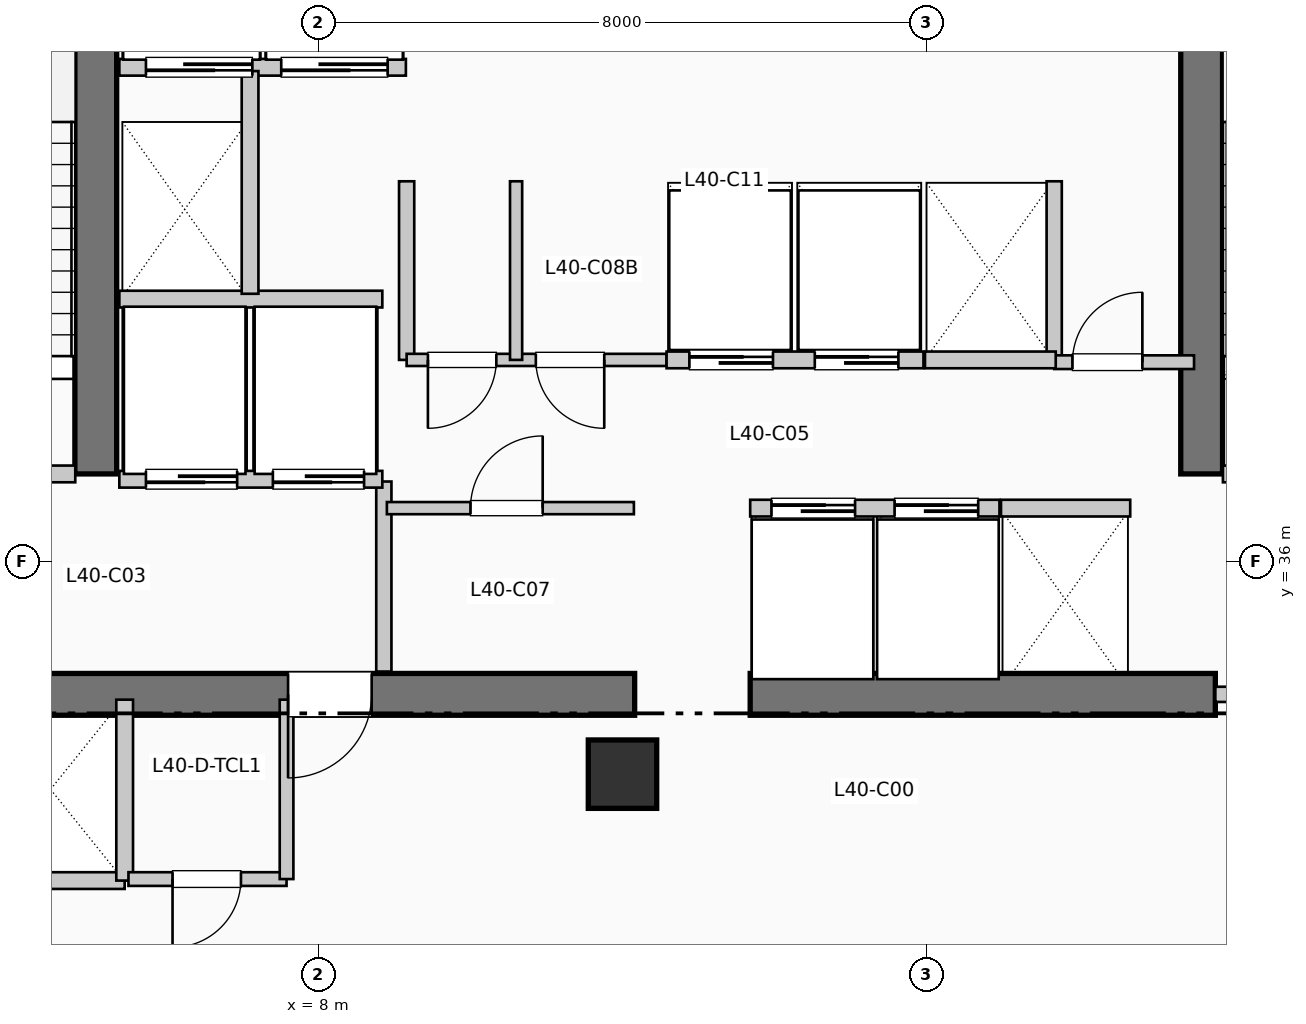
"""IFC4 building model, lengths in metres.
Left out: names, types, materials, properties, quantities, classifications, styles, units other than length and angle.
Written with IfcOpenShell. Run it as: python <this file> out.ifc"""

import sys

from ifc_helpers import new_model, si_unit, direction, frame, frame_2d, origin, origin_2d, place, context, subcontext, project, spatial, rectangle, extrude, element, fill, save


model = new_model("IFC4")
c1 = context("Model", 3, precision=1e-05, world=origin(), true_north=direction((0.0, 1.0)))
c2 = subcontext(c1, "Body", "Model", "MODEL_VIEW")
j1 = project(units=[si_unit("LENGTHUNIT", "METRE"), si_unit("PLANEANGLEUNIT", "RADIAN")], contexts=[c1])
p1 = place(None, origin())
s1 = spatial("IfcSite", under=j1, at=p1, CompositionType="ELEMENT")
p2 = place(p1, origin())
s2 = spatial("IfcBuilding", under=s1, at=p2, CompositionType="ELEMENT")
p3 = place(p2, frame((0.0, 0.0, 166.65)))
s3 = spatial("IfcBuildingStorey", under=s2, at=p3, CompositionType="ELEMENT", Elevation=166.65)
p4 = place(p3, frame((1.45, 34.25, 0.0), z_axis=(0.0, 0.0, 1.0), x_axis=(1.0, 0.0, 0.0)))
e1 = element("IfcWall", 1, at=p4, inside=s3, PredefinedType="SHEAR", context=c2, shape_type="SweptSolid", body=[
    extrude(rectangle(XDim=10.71, YDim=0.55, at=frame_2d((5.355, 0.0))), origin(), (0.0, 0.0, 1.0), 3.96),
])
p5 = place(p4, frame((7.25, 0.0, 0.0), z_axis=(0.0, 0.0, 1.0), x_axis=(-1.0, 0.0, 0.0)))
e2 = element("IfcOpeningElement", 2, at=p5, cuts=e1, PredefinedType="OPENING", context=c2, shape_type="SweptSolid", body=[
    extrude(rectangle(XDim=1.1, YDim=2.15, at=frame_2d((0.55, 1.075))), frame((0.0, 0.285, 0.0), z_axis=(0.0, -1.0, 0.0), x_axis=(1.0, 0.0, 0.0)), (0.0, 0.0, 1.0), 0.57),
])
p6 = place(p3, frame((13.68, 34.25, 0.0), z_axis=(0.0, 0.0, 1.0), x_axis=(1.0, 0.0, 0.0)))
e3 = element("IfcWall", 3, at=p6, inside=s3, PredefinedType="SHEAR", context=c2, shape_type="SweptSolid", body=[
    extrude(rectangle(XDim=6.12, YDim=0.55, at=frame_2d((3.06, 0.0))), origin(), (0.0, 0.0, 1.0), 3.96),
])
for number, where, z_axis, x_axis in (
    (4, (5.07, 37.15, 0.0), (0.0, 0.0, 1.0), (0.0, 1.0, 0.0)),
    (5, (19.62, 37.15, 0.0), (0.0, 0.0, 1.0), (0.0, 1.0, 0.0)),
):
    element("IfcWall", number, at=place(p3, frame(where, z_axis=z_axis, x_axis=x_axis)), inside=s3, PredefinedType="SHEAR", context=c2, shape_type="SweptSolid", body=[
        extrude(rectangle(XDim=7.89, YDim=0.55, at=frame_2d((3.945, 0.0))), origin(), (0.0, 0.0, 1.0), 3.96),
    ])
p7 = place(p3, frame((12.0, 33.2, 0.0), z_axis=(0.0, 0.0, 1.0), x_axis=(1.0, 0.0, 0.0)))
e6 = element("IfcColumn", 6, at=p7, inside=s3, PredefinedType="COLUMN", context=c2, shape_type="SweptSolid", body=[
    extrude(rectangle(XDim=0.9, YDim=0.9, at=origin_2d()), origin(), (0.0, 0.0, 1.0), 3.96),
])
p8 = place(p3, frame((1.65, 37.15, 0.0), z_axis=(0.0, 0.0, 1.0), x_axis=(1.0, 0.0, 0.0)))
e7 = element("IfcWall", 7, at=p8, inside=s3, PredefinedType="PARTITIONING", context=c2, shape_type="SweptSolid", body=[
    extrude(rectangle(XDim=3.15, YDim=0.22, at=frame_2d((1.575, 0.0))), origin(), (0.0, 0.0, 1.0), 3.71),
])
p9 = place(p8, frame((2.05, 0.0, 0.0), z_axis=(0.0, 0.0, 1.0), x_axis=(-1.0, 0.0, 0.0)))
e8 = element("IfcOpeningElement", 8, at=p9, cuts=e7, PredefinedType="OPENING", context=c2, shape_type="SweptSolid", body=[
    extrude(rectangle(XDim=1.05, YDim=2.15, at=frame_2d((0.525, 1.075))), frame((0.0, 0.12, 0.0), z_axis=(0.0, -1.0, 0.0), x_axis=(1.0, 0.0, 0.0)), (0.0, 0.0, 1.0), 0.24),
])
p10 = place(p3, frame((8.86, 34.55, 0.0), z_axis=(0.0, 0.0, 1.0), x_axis=(0.0, 1.0, 0.0)))
e9 = element("IfcWall", 9, at=p10, inside=s3, PredefinedType="PARTITIONING", context=c2, shape_type="SweptSolid", body=[
    extrude(rectangle(XDim=2.5, YDim=0.2, at=frame_2d((1.25, 0.0))), origin(), (0.0, 0.0, 1.0), 3.71),
])
p11 = place(p3, frame((19.9, 37.15, 0.0), z_axis=(0.0, 0.0, 1.0), x_axis=(1.0, 0.0, 0.0)))
e10 = element("IfcWall", 10, at=p11, inside=s3, PredefinedType="PARTITIONING", context=c2, shape_type="SweptSolid", body=[
    extrude(rectangle(XDim=3.15, YDim=0.22, at=frame_2d((1.575, 0.0))), origin(), (0.0, 0.0, 1.0), 3.71),
])
p12 = place(p11, frame((2.05, 0.0, 0.0), z_axis=(0.0, 0.0, 1.0), x_axis=(-1.0, 0.0, 0.0)))
e11 = element("IfcOpeningElement", 11, at=p12, cuts=e10, PredefinedType="OPENING", context=c2, shape_type="SweptSolid", body=[
    extrude(rectangle(XDim=1.05, YDim=2.15, at=frame_2d((0.525, 1.075))), frame((0.0, 0.12, 0.0), z_axis=(0.0, -1.0, 0.0), x_axis=(1.0, 0.0, 0.0)), (0.0, 0.0, 1.0), 0.24),
])
p13 = place(p3, frame((19.8, 34.25, 0.0), z_axis=(0.0, 0.0, 1.0), x_axis=(1.0, 0.0, 0.0)))
e12 = element("IfcWall", 12, at=p13, inside=s3, PredefinedType="PARTITIONING", context=c2, shape_type="SweptSolid", body=[
    extrude(rectangle(XDim=3.25, YDim=0.2, at=frame_2d((1.625, 0.0))), origin(), (0.0, 0.0, 1.0), 3.71),
])
p14 = place(p13, frame((2.15, 0.0, 0.0), z_axis=(0.0, 0.0, 1.0), x_axis=(-1.0, 0.0, 0.0)))
e13 = element("IfcOpeningElement", 13, at=p14, cuts=e12, PredefinedType="OPENING", context=c2, shape_type="SweptSolid", body=[
    extrude(rectangle(XDim=1.1, YDim=2.15, at=frame_2d((0.55, 1.075))), frame((0.0, 0.11, 0.0), z_axis=(0.0, -1.0, 0.0), x_axis=(1.0, 0.0, 0.0)), (0.0, 0.0, 1.0), 0.22),
])
p15 = place(p3, frame((5.38, 37.08, 0.0), z_axis=(0.0, 0.0, 1.0), x_axis=(1.0, 0.0, 0.0)))
e14 = element("IfcWall", 14, at=p15, inside=s3, PredefinedType="PARTITIONING", context=c2, shape_type="SweptSolid", body=[
    extrude(rectangle(XDim=3.46, YDim=0.22, at=frame_2d((1.73, 0.0))), origin(), (0.0, 0.0, 1.0), 3.71),
])
p16 = place(p15, frame((1.55, 0.0, 0.0), z_axis=(0.0, 0.0, 1.0), x_axis=(-1.0, 0.0, 0.0)))
e15 = element("IfcOpeningElement", 15, at=p16, cuts=e14, PredefinedType="OPENING", context=c2, shape_type="SweptSolid", body=[
    extrude(rectangle(XDim=1.2, YDim=2.2, at=frame_2d((0.6, 1.1))), frame((0.0, 0.12, 0.0), z_axis=(0.0, -1.0, 0.0), x_axis=(1.0, 0.0, 0.0)), (0.0, 0.0, 1.0), 0.24),
])
p17 = place(p15, frame((3.22, 0.0, 0.0), z_axis=(0.0, 0.0, 1.0), x_axis=(-1.0, 0.0, 0.0)))
e16 = element("IfcOpeningElement", 16, at=p17, cuts=e14, PredefinedType="OPENING", context=c2, shape_type="SweptSolid", body=[
    extrude(rectangle(XDim=1.2, YDim=2.2, at=frame_2d((0.6, 1.1))), frame((0.0, 0.12, 0.0), z_axis=(0.0, -1.0, 0.0), x_axis=(1.0, 0.0, 0.0)), (0.0, 0.0, 1.0), 0.24),
])
p18 = place(p3, frame((5.38, 39.45, 0.0), z_axis=(0.0, 0.0, 1.0), x_axis=(1.0, 0.0, 0.0)))
e17 = element("IfcWall", 17, at=p18, inside=s3, PredefinedType="PARTITIONING", context=c2, shape_type="SweptSolid", body=[
    extrude(rectangle(XDim=3.46, YDim=0.22, at=frame_2d((1.73, 0.0))), origin(), (0.0, 0.0, 1.0), 3.71),
])
p19 = place(p3, frame((5.38, 42.5, 0.0), z_axis=(0.0, 0.0, 1.0), x_axis=(1.0, 0.0, 0.0)))
e18 = element("IfcWall", 18, at=p19, inside=s3, PredefinedType="PARTITIONING", context=c2, shape_type="SweptSolid", body=[
    extrude(rectangle(XDim=3.77, YDim=0.22, at=frame_2d((1.885, 0.0))), origin(), (0.0, 0.0, 1.0), 3.71),
])
p20 = place(p19, frame((1.75, 0.0, 0.0), z_axis=(0.0, 0.0, 1.0), x_axis=(-1.0, 0.0, 0.0)))
e19 = element("IfcOpeningElement", 19, at=p20, cuts=e18, PredefinedType="OPENING", context=c2, shape_type="SweptSolid", body=[
    extrude(rectangle(XDim=1.4, YDim=2.2, at=frame_2d((0.7, 1.1))), frame((0.0, 0.12, 0.0), z_axis=(0.0, -1.0, 0.0), x_axis=(1.0, 0.0, 0.0)), (0.0, 0.0, 1.0), 0.24),
])
p21 = place(p19, frame((3.53, 0.0, 0.0), z_axis=(0.0, 0.0, 1.0), x_axis=(-1.0, 0.0, 0.0)))
e20 = element("IfcOpeningElement", 20, at=p21, cuts=e18, PredefinedType="OPENING", context=c2, shape_type="SweptSolid", body=[
    extrude(rectangle(XDim=1.4, YDim=2.2, at=frame_2d((0.7, 1.1))), frame((0.0, 0.12, 0.0), z_axis=(0.0, -1.0, 0.0), x_axis=(1.0, 0.0, 0.0)), (0.0, 0.0, 1.0), 0.24),
])
p22 = place(p3, frame((7.1, 39.52, 0.0), z_axis=(0.0, 0.0, 1.0), x_axis=(0.0, 1.0, 0.0)))
e21 = element("IfcWall", 21, at=p22, inside=s3, PredefinedType="PARTITIONING", context=c2, shape_type="SweptSolid", body=[
    extrude(rectangle(XDim=2.93, YDim=0.22, at=frame_2d((1.465, 0.0))), origin(), (0.0, 0.0, 1.0), 3.71),
])
p23 = place(p3, frame((1.55, 31.8, 0.0), z_axis=(0.0, 0.0, 1.0), x_axis=(1.0, 0.0, 0.0)))
e22 = element("IfcWall", 22, at=p23, inside=s3, PredefinedType="PARTITIONING", context=c2, shape_type="SweptSolid", body=[
    extrude(rectangle(XDim=3.9, YDim=0.22, at=frame_2d((1.95, 0.0))), origin(), (0.0, 0.0, 1.0), 3.71),
])
p24 = place(p3, frame((5.45, 31.8, 0.0), z_axis=(0.0, 0.0, 1.0), x_axis=(0.0, 1.0, 0.0)))
e23 = element("IfcWall", 23, at=p24, inside=s3, PredefinedType="PARTITIONING", context=c2, shape_type="SweptSolid", body=[
    extrude(rectangle(XDim=2.38, YDim=0.22, at=frame_2d((1.19, 0.0))), origin(), (0.0, 0.0, 1.0), 3.71),
])
for number, where, z_axis, x_axis in (
    (24, (9.16, 38.65, 0.0), (0.0, 0.0, 1.0), (0.0, 1.0, 0.0)),
    (25, (17.68, 38.65, 0.0), (0.0, 0.0, 1.0), (0.0, 1.0, 0.0)),
):
    element("IfcWall", number, at=place(p3, frame(where, z_axis=z_axis, x_axis=x_axis)), inside=s3, PredefinedType="PARTITIONING", context=c2, shape_type="SweptSolid", body=[
        extrude(rectangle(XDim=2.35, YDim=0.2, at=frame_2d((1.175, 0.0))), origin(), (0.0, 0.0, 1.0), 3.71),
    ])
p25 = place(p3, frame((17.68, 38.62, 0.0), z_axis=(0.0, 0.0, 1.0), x_axis=(1.0, 0.0, 0.0)))
e26 = element("IfcWall", 26, at=p25, inside=s3, PredefinedType="PARTITIONING", context=c2, shape_type="SweptSolid", body=[
    extrude(rectangle(XDim=1.84, YDim=0.18, at=frame_2d((0.92, 0.0))), origin(), (0.0, 0.0, 1.0), 3.71),
])
p26 = place(p25, frame((0.24, 0.0, 0.0)))
e27 = element("IfcOpeningElement", 27, at=p26, cuts=e26, PredefinedType="OPENING", context=c2, shape_type="SweptSolid", body=[
    extrude(rectangle(XDim=0.92, YDim=2.1, at=frame_2d((0.46, 1.05))), frame((0.0, 0.1, 0.0), z_axis=(0.0, -1.0, 0.0), x_axis=(1.0, 0.0, 0.0)), (0.0, 0.0, 1.0), 0.2),
])
p27 = place(p3, frame((5.5, 31.82, 0.0), z_axis=(0.0, 0.0, 1.0), x_axis=(1.0, 0.0, 0.0)))
e28 = element("IfcWall", 28, at=p27, inside=s3, PredefinedType="PLUMBINGWALL", context=c2, shape_type="SweptSolid", body=[
    extrude(rectangle(XDim=2.08, YDim=0.18, at=frame_2d((1.04, 0.0))), origin(), (0.0, 0.0, 1.0), 3.71),
])
p28 = place(p27, frame((1.48, 0.0, 0.0), z_axis=(0.0, 0.0, 1.0), x_axis=(-1.0, 0.0, 0.0)))
e29 = element("IfcOpeningElement", 29, at=p28, cuts=e28, PredefinedType="OPENING", context=c2, shape_type="SweptSolid", body=[
    extrude(rectangle(XDim=0.9, YDim=2.1, at=frame_2d((0.45, 1.05))), frame((0.0, 0.1, 0.0), z_axis=(0.0, -1.0, 0.0), x_axis=(1.0, 0.0, 0.0)), (0.0, 0.0, 1.0), 0.2),
])
p29 = place(p3, frame((7.58, 31.82, 0.0), z_axis=(0.0, 0.0, 1.0), x_axis=(0.0, 1.0, 0.0)))
e30 = element("IfcWall", 30, at=p29, inside=s3, PredefinedType="PLUMBINGWALL", context=c2, shape_type="SweptSolid", body=[
    extrude(rectangle(XDim=2.36, YDim=0.18, at=frame_2d((1.18, 0.0))), origin(), (0.0, 0.0, 1.0), 3.71),
])
p30 = place(p3, frame((8.9, 36.7, 0.0), z_axis=(0.0, 0.0, 1.0), x_axis=(1.0, 0.0, 0.0)))
e31 = element("IfcWall", 31, at=p30, inside=s3, PredefinedType="PARTITIONING", context=c2, shape_type="SweptSolid", body=[
    extrude(rectangle(XDim=3.25, YDim=0.16, at=frame_2d((1.625, 0.0))), origin(), (0.0, 0.0, 1.0), 3.71),
])
p31 = place(p30, frame((1.1, 0.0, 0.0)))
e32 = element("IfcOpeningElement", 32, at=p31, cuts=e31, PredefinedType="OPENING", context=c2, shape_type="SweptSolid", body=[
    extrude(rectangle(XDim=0.95, YDim=2.15, at=frame_2d((0.475, 1.075))), frame((0.0, 0.09, 0.0), z_axis=(0.0, -1.0, 0.0), x_axis=(1.0, 0.0, 0.0)), (0.0, 0.0, 1.0), 0.18),
])
p32 = place(p3, frame((9.16, 38.65, 0.0), z_axis=(0.0, 0.0, 1.0), x_axis=(1.0, 0.0, 0.0)))
e33 = element("IfcWall", 33, at=p32, inside=s3, PredefinedType="PARTITIONING", context=c2, shape_type="SweptSolid", body=[
    extrude(rectangle(XDim=3.42, YDim=0.16, at=frame_2d((1.71, 0.0))), origin(), (0.0, 0.0, 1.0), 3.71),
])
p33 = place(p32, frame((1.18, 0.0, 0.0), z_axis=(0.0, 0.0, 1.0), x_axis=(-1.0, 0.0, 0.0)))
e34 = element("IfcOpeningElement", 34, at=p33, cuts=e33, PredefinedType="OPENING", context=c2, shape_type="SweptSolid", body=[
    extrude(rectangle(XDim=0.9, YDim=2.15, at=frame_2d((0.45, 1.075))), frame((0.0, 0.09, 0.0), z_axis=(0.0, -1.0, 0.0), x_axis=(1.0, 0.0, 0.0)), (0.0, 0.0, 1.0), 0.18),
])
p34 = place(p32, frame((2.6, 0.0, 0.0), z_axis=(0.0, 0.0, 1.0), x_axis=(-1.0, 0.0, 0.0)))
e35 = element("IfcOpeningElement", 35, at=p34, cuts=e33, PredefinedType="OPENING", context=c2, shape_type="SweptSolid", body=[
    extrude(rectangle(XDim=0.9, YDim=2.15, at=frame_2d((0.45, 1.075))), frame((0.0, 0.09, 0.0), z_axis=(0.0, -1.0, 0.0), x_axis=(1.0, 0.0, 0.0)), (0.0, 0.0, 1.0), 0.18),
])
p35 = place(p3, frame((10.6, 38.65, 0.0), z_axis=(0.0, 0.0, 1.0), x_axis=(0.0, 1.0, 0.0)))
e36 = element("IfcWall", 36, at=p35, inside=s3, PredefinedType="PARTITIONING", context=c2, shape_type="SweptSolid", body=[
    extrude(rectangle(XDim=2.35, YDim=0.16, at=frame_2d((1.175, 0.0))), origin(), (0.0, 0.0, 1.0), 3.71),
])
p36 = place(p3, frame((13.68, 36.7, 0.0), z_axis=(0.0, 0.0, 1.0), x_axis=(1.0, 0.0, 0.0)))
e37 = element("IfcWall", 37, at=p36, inside=s3, PredefinedType="PARTITIONING", context=c2, shape_type="SweptSolid", body=[
    extrude(rectangle(XDim=3.28, YDim=0.22, at=frame_2d((1.64, 0.0))), origin(), (0.0, 0.0, 1.0), 3.71),
])
p37 = place(p36, frame((0.28, 0.0, 0.0)))
e38 = element("IfcOpeningElement", 38, at=p37, cuts=e37, PredefinedType="OPENING", context=c2, shape_type="SweptSolid", body=[
    extrude(rectangle(XDim=1.1, YDim=2.2, at=frame_2d((0.55, 1.1))), frame((0.0, 0.12, 0.0), z_axis=(0.0, -1.0, 0.0), x_axis=(1.0, 0.0, 0.0)), (0.0, 0.0, 1.0), 0.24),
])
p38 = place(p36, frame((1.9, 0.0, 0.0)))
e39 = element("IfcOpeningElement", 39, at=p38, cuts=e37, PredefinedType="OPENING", context=c2, shape_type="SweptSolid", body=[
    extrude(rectangle(XDim=1.1, YDim=2.2, at=frame_2d((0.55, 1.1))), frame((0.0, 0.12, 0.0), z_axis=(0.0, -1.0, 0.0), x_axis=(1.0, 0.0, 0.0)), (0.0, 0.0, 1.0), 0.24),
])
p39 = place(p3, frame((12.58, 38.65, 0.0), z_axis=(0.0, 0.0, 1.0), x_axis=(1.0, 0.0, 0.0)))
e40 = element("IfcWall", 40, at=p39, inside=s3, PredefinedType="PARTITIONING", context=c2, shape_type="SweptSolid", body=[
    extrude(rectangle(XDim=3.38, YDim=0.22, at=frame_2d((1.69, 0.0))), origin(), (0.0, 0.0, 1.0), 3.71),
])
p40 = place(p39, frame((0.3, 0.0, 0.0)))
e41 = element("IfcOpeningElement", 41, at=p40, cuts=e40, PredefinedType="OPENING", context=c2, shape_type="SweptSolid", body=[
    extrude(rectangle(XDim=1.1, YDim=2.2, at=frame_2d((0.55, 1.1))), frame((0.0, 0.12, 0.0), z_axis=(0.0, -1.0, 0.0), x_axis=(1.0, 0.0, 0.0)), (0.0, 0.0, 1.0), 0.24),
])
p41 = place(p39, frame((1.95, 0.0, 0.0)))
e42 = element("IfcOpeningElement", 42, at=p41, cuts=e40, PredefinedType="OPENING", context=c2, shape_type="SweptSolid", body=[
    extrude(rectangle(XDim=1.1, YDim=2.2, at=frame_2d((0.55, 1.1))), frame((0.0, 0.12, 0.0), z_axis=(0.0, -1.0, 0.0), x_axis=(1.0, 0.0, 0.0)), (0.0, 0.0, 1.0), 0.24),
])
p42 = place(p3, frame((16.98, 36.7, 0.0), z_axis=(0.0, 0.0, 1.0), x_axis=(1.0, 0.0, 0.0)))
e43 = element("IfcWall", 43, at=p42, inside=s3, PredefinedType="PARTITIONING", context=c2, shape_type="SweptSolid", body=[
    extrude(rectangle(XDim=1.7, YDim=0.22, at=frame_2d((0.85, 0.0))), origin(), (0.0, 0.0, 1.0), 3.71),
])
p43 = place(p3, frame((15.98, 38.65, 0.0), z_axis=(0.0, 0.0, 1.0), x_axis=(1.0, 0.0, 0.0)))
e44 = element("IfcWall", 44, at=p43, inside=s3, PredefinedType="PARTITIONING", context=c2, shape_type="SweptSolid", body=[
    extrude(rectangle(XDim=1.72, YDim=0.22, at=frame_2d((0.86, 0.0))), origin(), (0.0, 0.0, 1.0), 3.71),
])
p44 = place(p5, origin())
e45 = element("IfcDoor", 45, at=p44, inside=s3, OperationType="SINGLE_SWING_LEFT", PredefinedType="DOOR", context=c2, shape_type="SweptSolid", body=[
    extrude(rectangle(XDim=1.1, YDim=2.15, at=frame_2d((0.55, 1.075))), frame((0.0, 0.025, 0.0), z_axis=(0.0, -1.0, 0.0), x_axis=(1.0, 0.0, 0.0)), (0.0, 0.0, 1.0), 0.05),
])
fill(e2, e45)
p45 = place(p16, origin())
e46 = element("IfcDoor", 46, at=p45, inside=s3, OperationType="SLIDING_TO_RIGHT", PredefinedType="DOOR", context=c2, shape_type="SweptSolid", body=[
    extrude(rectangle(XDim=1.2, YDim=2.2, at=frame_2d((0.6, 1.1))), frame((0.0, 0.025, 0.0), z_axis=(0.0, -1.0, 0.0), x_axis=(1.0, 0.0, 0.0)), (0.0, 0.0, 1.0), 0.05),
])
fill(e15, e46)
p46 = place(p17, origin())
e47 = element("IfcDoor", 47, at=p46, inside=s3, OperationType="SLIDING_TO_RIGHT", PredefinedType="DOOR", context=c2, shape_type="SweptSolid", body=[
    extrude(rectangle(XDim=1.2, YDim=2.2, at=frame_2d((0.6, 1.1))), frame((0.0, 0.025, 0.0), z_axis=(0.0, -1.0, 0.0), x_axis=(1.0, 0.0, 0.0)), (0.0, 0.0, 1.0), 0.05),
])
fill(e16, e47)
p47 = place(p20, origin())
e48 = element("IfcDoor", 48, at=p47, inside=s3, OperationType="SLIDING_TO_LEFT", PredefinedType="DOOR", context=c2, shape_type="SweptSolid", body=[
    extrude(rectangle(XDim=1.4, YDim=2.2, at=frame_2d((0.7, 1.1))), frame((0.0, 0.025, 0.0), z_axis=(0.0, -1.0, 0.0), x_axis=(1.0, 0.0, 0.0)), (0.0, 0.0, 1.0), 0.05),
])
fill(e19, e48)
p48 = place(p21, origin())
e49 = element("IfcDoor", 49, at=p48, inside=s3, OperationType="SLIDING_TO_LEFT", PredefinedType="DOOR", context=c2, shape_type="SweptSolid", body=[
    extrude(rectangle(XDim=1.4, YDim=2.2, at=frame_2d((0.7, 1.1))), frame((0.0, 0.025, 0.0), z_axis=(0.0, -1.0, 0.0), x_axis=(1.0, 0.0, 0.0)), (0.0, 0.0, 1.0), 0.05),
])
fill(e20, e49)
p49 = place(p26, origin())
e50 = element("IfcDoor", 50, at=p49, inside=s3, OperationType="SINGLE_SWING_RIGHT", PredefinedType="DOOR", context=c2, shape_type="SweptSolid", body=[
    extrude(rectangle(XDim=0.92, YDim=2.1, at=frame_2d((0.46, 1.05))), frame((0.0, 0.025, 0.0), z_axis=(0.0, -1.0, 0.0), x_axis=(1.0, 0.0, 0.0)), (0.0, 0.0, 1.0), 0.05),
])
fill(e27, e50)
p50 = place(p28, origin())
e51 = element("IfcDoor", 51, at=p50, inside=s3, OperationType="SINGLE_SWING_LEFT", PredefinedType="DOOR", context=c2, shape_type="SweptSolid", body=[
    extrude(rectangle(XDim=0.9, YDim=2.1, at=frame_2d((0.45, 1.05))), frame((0.0, 0.025, 0.0), z_axis=(0.0, -1.0, 0.0), x_axis=(1.0, 0.0, 0.0)), (0.0, 0.0, 1.0), 0.05),
])
fill(e29, e51)
p51 = place(p31, origin())
e52 = element("IfcDoor", 52, at=p51, inside=s3, OperationType="SINGLE_SWING_RIGHT", PredefinedType="DOOR", context=c2, shape_type="SweptSolid", body=[
    extrude(rectangle(XDim=0.95, YDim=2.15, at=frame_2d((0.475, 1.075))), frame((0.0, 0.025, 0.0), z_axis=(0.0, -1.0, 0.0), x_axis=(1.0, 0.0, 0.0)), (0.0, 0.0, 1.0), 0.05),
])
fill(e32, e52)
p52 = place(p33, origin())
e53 = element("IfcDoor", 53, at=p52, inside=s3, OperationType="SINGLE_SWING_LEFT", PredefinedType="DOOR", context=c2, shape_type="SweptSolid", body=[
    extrude(rectangle(XDim=0.9, YDim=2.15, at=frame_2d((0.45, 1.075))), frame((0.0, 0.025, 0.0), z_axis=(0.0, -1.0, 0.0), x_axis=(1.0, 0.0, 0.0)), (0.0, 0.0, 1.0), 0.05),
])
fill(e34, e53)
p53 = place(p34, origin())
e54 = element("IfcDoor", 54, at=p53, inside=s3, OperationType="SINGLE_SWING_RIGHT", PredefinedType="DOOR", context=c2, shape_type="SweptSolid", body=[
    extrude(rectangle(XDim=0.9, YDim=2.15, at=frame_2d((0.45, 1.075))), frame((0.0, 0.025, 0.0), z_axis=(0.0, -1.0, 0.0), x_axis=(1.0, 0.0, 0.0)), (0.0, 0.0, 1.0), 0.05),
])
fill(e35, e54)
p54 = place(p37, origin())
e55 = element("IfcDoor", 55, at=p54, inside=s3, OperationType="SLIDING_TO_RIGHT", PredefinedType="DOOR", context=c2, shape_type="SweptSolid", body=[
    extrude(rectangle(XDim=1.1, YDim=2.2, at=frame_2d((0.55, 1.1))), frame((0.0, 0.025, 0.0), z_axis=(0.0, -1.0, 0.0), x_axis=(1.0, 0.0, 0.0)), (0.0, 0.0, 1.0), 0.05),
])
fill(e38, e55)
p55 = place(p38, origin())
e56 = element("IfcDoor", 56, at=p55, inside=s3, OperationType="SLIDING_TO_RIGHT", PredefinedType="DOOR", context=c2, shape_type="SweptSolid", body=[
    extrude(rectangle(XDim=1.1, YDim=2.2, at=frame_2d((0.55, 1.1))), frame((0.0, 0.025, 0.0), z_axis=(0.0, -1.0, 0.0), x_axis=(1.0, 0.0, 0.0)), (0.0, 0.0, 1.0), 0.05),
])
fill(e39, e56)
p56 = place(p40, origin())
e57 = element("IfcDoor", 57, at=p56, inside=s3, OperationType="SLIDING_TO_RIGHT", PredefinedType="DOOR", context=c2, shape_type="SweptSolid", body=[
    extrude(rectangle(XDim=1.1, YDim=2.2, at=frame_2d((0.55, 1.1))), frame((0.0, 0.025, 0.0), z_axis=(0.0, -1.0, 0.0), x_axis=(1.0, 0.0, 0.0)), (0.0, 0.0, 1.0), 0.05),
])
fill(e41, e57)
p57 = place(p41, origin())
e58 = element("IfcDoor", 58, at=p57, inside=s3, OperationType="SLIDING_TO_RIGHT", PredefinedType="DOOR", context=c2, shape_type="SweptSolid", body=[
    extrude(rectangle(XDim=1.1, YDim=2.2, at=frame_2d((0.55, 1.1))), frame((0.0, 0.025, 0.0), z_axis=(0.0, -1.0, 0.0), x_axis=(1.0, 0.0, 0.0)), (0.0, 0.0, 1.0), 0.05),
])
fill(e42, e58)
save(model, sys.argv[1])
